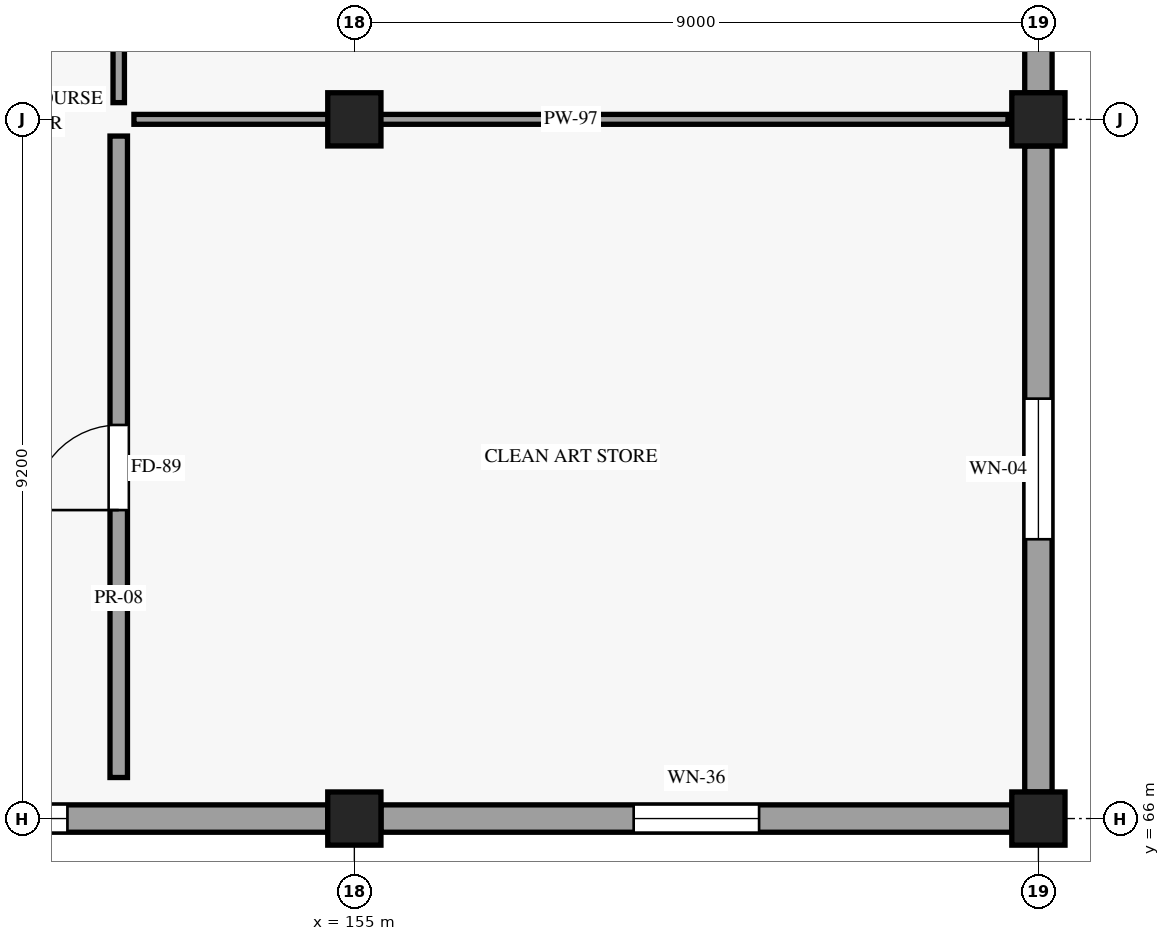
"""IFC4 building model, lengths in metres.
Left out: names, types, materials, properties, quantities, classifications, styles, units other than length and angle.
Written with IfcOpenShell. Run it as: python <this file> out.ifc"""

import sys

from ifc_helpers import new_model, si_unit, direction, frame, frame_2d, origin, origin_2d, place, context, subcontext, project, spatial, rectangle, extrude, element, fill, save


model = new_model("IFC4")
c1 = context("Model", 3, precision=1e-05, world=origin(), true_north=direction((0.0, 1.0)))
c2 = subcontext(c1, "Body", "Model", "MODEL_VIEW")
j1 = project(units=[si_unit("LENGTHUNIT", "METRE"), si_unit("PLANEANGLEUNIT", "RADIAN")], contexts=[c1])
p1 = place(None, origin())
s1 = spatial("IfcSite", under=j1, at=p1, CompositionType="ELEMENT")
p2 = place(p1, origin())
s2 = spatial("IfcBuilding", under=s1, at=p2, CompositionType="ELEMENT")
p3 = place(p2, frame((0.0, 0.0, 5.4)))
s3 = spatial("IfcBuildingStorey", under=s2, at=p3, CompositionType="ELEMENT", Elevation=5.4)
for number, where, z_axis, x_axis in (
    (1, (155.0, 66.0, 0.0), (0.0, 0.0, 1.0), (1.0, 0.0, 0.0)),
    (2, (155.0, 75.2, 0.0), (0.0, 0.0, 1.0), (1.0, 0.0, 0.0)),
    (3, (164.0, 66.0, 0.0), (0.0, 0.0, 1.0), (1.0, 0.0, 0.0)),
    (4, (164.0, 75.2, 0.0), (0.0, 0.0, 1.0), (1.0, 0.0, 0.0)),
):
    element("IfcColumn", number, at=place(p3, frame(where, z_axis=z_axis, x_axis=x_axis)), inside=s3, PredefinedType="COLUMN", context=c2, shape_type="SweptSolid", body=[
        extrude(rectangle(XDim=0.7, YDim=0.7, at=origin_2d()), origin(), (0.0, 0.0, 1.0), 4.8),
    ])
p4 = place(p3, frame((146.35, 66.0, 0.0), z_axis=(0.0, 0.0, 1.0), x_axis=(1.0, 0.0, 0.0)))
e5 = element("IfcWall", 5, at=p4, inside=s3, PredefinedType="STANDARD", context=c2, shape_type="SweptSolid", body=[
    extrude(rectangle(XDim=8.3, YDim=0.36, at=frame_2d((4.15, 0.0))), origin(), (0.0, 0.0, 1.0), 3.175),
])
p5 = place(p4, frame((4.875, 0.0, 0.85), z_axis=(0.0, 0.0, 1.0), x_axis=(-1.0, 0.0, 0.0)))
e6 = element("IfcOpeningElement", 6, at=p5, cuts=e5, PredefinedType="OPENING", context=c2, shape_type="SweptSolid", body=[
    extrude(rectangle(XDim=1.45, YDim=1.85, at=frame_2d((0.725, 0.925))), frame((0.0, 0.19, 0.0), z_axis=(0.0, -1.0, 0.0), x_axis=(1.0, 0.0, 0.0)), (0.0, 0.0, 1.0), 0.38),
])
p6 = place(p3, frame((155.35, 66.0, 0.0), z_axis=(0.0, 0.0, 1.0), x_axis=(1.0, 0.0, 0.0)))
e7 = element("IfcWall", 7, at=p6, inside=s3, PredefinedType="STANDARD", context=c2, shape_type="SweptSolid", body=[
    extrude(rectangle(XDim=8.3, YDim=0.36, at=frame_2d((4.15, 0.0))), origin(), (0.0, 0.0, 1.0), 3.175),
])
p7 = place(p6, frame((4.975, 0.0, 0.85), z_axis=(0.0, 0.0, 1.0), x_axis=(-1.0, 0.0, 0.0)))
e8 = element("IfcOpeningElement", 8, at=p7, cuts=e7, PredefinedType="OPENING", context=c2, shape_type="SweptSolid", body=[
    extrude(rectangle(XDim=1.65, YDim=2.0, at=frame_2d((0.825, 1.0))), frame((0.0, 0.19, 0.0), z_axis=(0.0, -1.0, 0.0), x_axis=(1.0, 0.0, 0.0)), (0.0, 0.0, 1.0), 0.38),
])
p8 = place(p3, frame((164.0, 66.35, 0.0), z_axis=(0.0, 0.0, 1.0), x_axis=(0.0, 1.0, 0.0)))
e9 = element("IfcWall", 9, at=p8, inside=s3, PredefinedType="STANDARD", context=c2, shape_type="SweptSolid", body=[
    extrude(rectangle(XDim=8.5, YDim=0.36, at=frame_2d((4.25, 0.0))), origin(), (0.0, 0.0, 1.0), 3.175),
])
p9 = place(p8, frame((5.175, 0.0, 0.85), z_axis=(0.0, 0.0, 1.0), x_axis=(-1.0, 0.0, 0.0)))
e10 = element("IfcOpeningElement", 10, at=p9, cuts=e9, PredefinedType="OPENING", context=c2, shape_type="SweptSolid", body=[
    extrude(rectangle(XDim=1.85, YDim=2.1, at=frame_2d((0.925, 1.05))), frame((0.0, 0.19, 0.0), z_axis=(0.0, -1.0, 0.0), x_axis=(1.0, 0.0, 0.0)), (0.0, 0.0, 1.0), 0.38),
])
p10 = place(p3, frame((164.0, 75.55, 0.0), z_axis=(0.0, 0.0, 1.0), x_axis=(0.0, 1.0, 0.0)))
e11 = element("IfcWall", 11, at=p10, inside=s3, PredefinedType="STANDARD", context=c2, shape_type="SweptSolid", body=[
    extrude(rectangle(XDim=8.5, YDim=0.36, at=frame_2d((4.25, 0.0))), origin(), (0.0, 0.0, 1.0), 3.175),
])
p11 = place(p10, frame((5.225, 0.0, 0.85), z_axis=(0.0, 0.0, 1.0), x_axis=(-1.0, 0.0, 0.0)))
e12 = element("IfcOpeningElement", 12, at=p11, cuts=e11, PredefinedType="OPENING", context=c2, shape_type="SweptSolid", body=[
    extrude(rectangle(XDim=1.95, YDim=2.1, at=frame_2d((0.975, 1.05))), frame((0.0, 0.19, 0.0), z_axis=(0.0, -1.0, 0.0), x_axis=(1.0, 0.0, 0.0)), (0.0, 0.0, 1.0), 0.38),
])
p12 = place(p3, frame((151.9, 66.54, 0.0), z_axis=(0.0, 0.0, 1.0), x_axis=(0.0, 1.0, 0.0)))
e13 = element("IfcWall", 13, at=p12, inside=s3, PredefinedType="PARTITIONING", context=c2, shape_type="SweptSolid", body=[
    extrude(rectangle(XDim=8.44, YDim=0.23, at=frame_2d((4.22, 0.0))), origin(), (0.0, 0.0, 1.0), 3.175),
])
p13 = place(p12, frame((3.519, 0.0, 0.0)))
e14 = element("IfcOpeningElement", 14, at=p13, cuts=e13, PredefinedType="OPENING", context=c2, shape_type="SweptSolid", body=[
    extrude(rectangle(XDim=1.12, YDim=2.26, at=frame_2d((0.56, 1.13))), frame((0.0, 0.125, 0.0), z_axis=(0.0, -1.0, 0.0), x_axis=(1.0, 0.0, 0.0)), (0.0, 0.0, 1.0), 0.25),
])
p14 = place(p3, frame((152.1, 75.2, 0.0), z_axis=(0.0, 0.0, 1.0), x_axis=(1.0, 0.0, 0.0)))
e15 = element("IfcWall", 15, at=p14, inside=s3, PredefinedType="PARTITIONING", context=c2, shape_type="SweptSolid", body=[
    extrude(rectangle(XDim=11.5, YDim=0.13, at=frame_2d((5.75, 0.0))), origin(), (0.0, 0.0, 1.0), 3.175),
])
p15 = place(p3, frame((151.9, 75.42, 0.0), z_axis=(0.0, 0.0, 1.0), x_axis=(0.0, 1.0, 0.0)))
e16 = element("IfcWall", 16, at=p15, inside=s3, PredefinedType="PARTITIONING", context=c2, shape_type="SweptSolid", body=[
    extrude(rectangle(XDim=17.96, YDim=0.15, at=frame_2d((8.98, 0.0))), origin(), (0.0, 0.0, 1.0), 3.175),
])
p16 = place(p15, frame((3.936, 0.0, 0.0)))
e17 = element("IfcOpeningElement", 17, at=p16, cuts=e16, PredefinedType="OPENING", context=c2, shape_type="SweptSolid", body=[
    extrude(rectangle(XDim=1.2, YDim=2.3, at=frame_2d((0.6, 1.15))), frame((0.0, 0.085, 0.0), z_axis=(0.0, -1.0, 0.0), x_axis=(1.0, 0.0, 0.0)), (0.0, 0.0, 1.0), 0.17),
])
p17 = place(p5, origin())
e18 = element("IfcWindow", 18, at=p17, inside=s3, PartitioningType="SINGLE_PANEL", PredefinedType="WINDOW", context=c2, shape_type="SweptSolid", body=[
    extrude(rectangle(XDim=1.45, YDim=1.85, at=frame_2d((0.725, 0.925))), frame((0.0, 0.03, 0.0), z_axis=(0.0, -1.0, 0.0), x_axis=(1.0, 0.0, 0.0)), (0.0, 0.0, 1.0), 0.06),
])
fill(e6, e18)
p18 = place(p7, origin())
e19 = element("IfcWindow", 19, at=p18, inside=s3, PartitioningType="SINGLE_PANEL", PredefinedType="WINDOW", context=c2, shape_type="SweptSolid", body=[
    extrude(rectangle(XDim=1.65, YDim=2.0, at=frame_2d((0.825, 1.0))), frame((0.0, 0.03, 0.0), z_axis=(0.0, -1.0, 0.0), x_axis=(1.0, 0.0, 0.0)), (0.0, 0.0, 1.0), 0.06),
])
fill(e8, e19)
p19 = place(p9, origin())
e20 = element("IfcWindow", 20, at=p19, inside=s3, PartitioningType="SINGLE_PANEL", PredefinedType="WINDOW", context=c2, shape_type="SweptSolid", body=[
    extrude(rectangle(XDim=1.85, YDim=2.1, at=frame_2d((0.925, 1.05))), frame((0.0, 0.03, 0.0), z_axis=(0.0, -1.0, 0.0), x_axis=(1.0, 0.0, 0.0)), (0.0, 0.0, 1.0), 0.06),
])
fill(e10, e20)
p20 = place(p13, origin())
e21 = element("IfcDoor", 21, at=p20, inside=s3, OperationType="SINGLE_SWING_LEFT", PredefinedType="DOOR", context=c2, shape_type="SweptSolid", body=[
    extrude(rectangle(XDim=1.12, YDim=2.26, at=frame_2d((0.56, 1.13))), frame((0.0, 0.025, 0.0), z_axis=(0.0, -1.0, 0.0), x_axis=(1.0, 0.0, 0.0)), (0.0, 0.0, 1.0), 0.05),
])
fill(e14, e21)
save(model, sys.argv[1])
